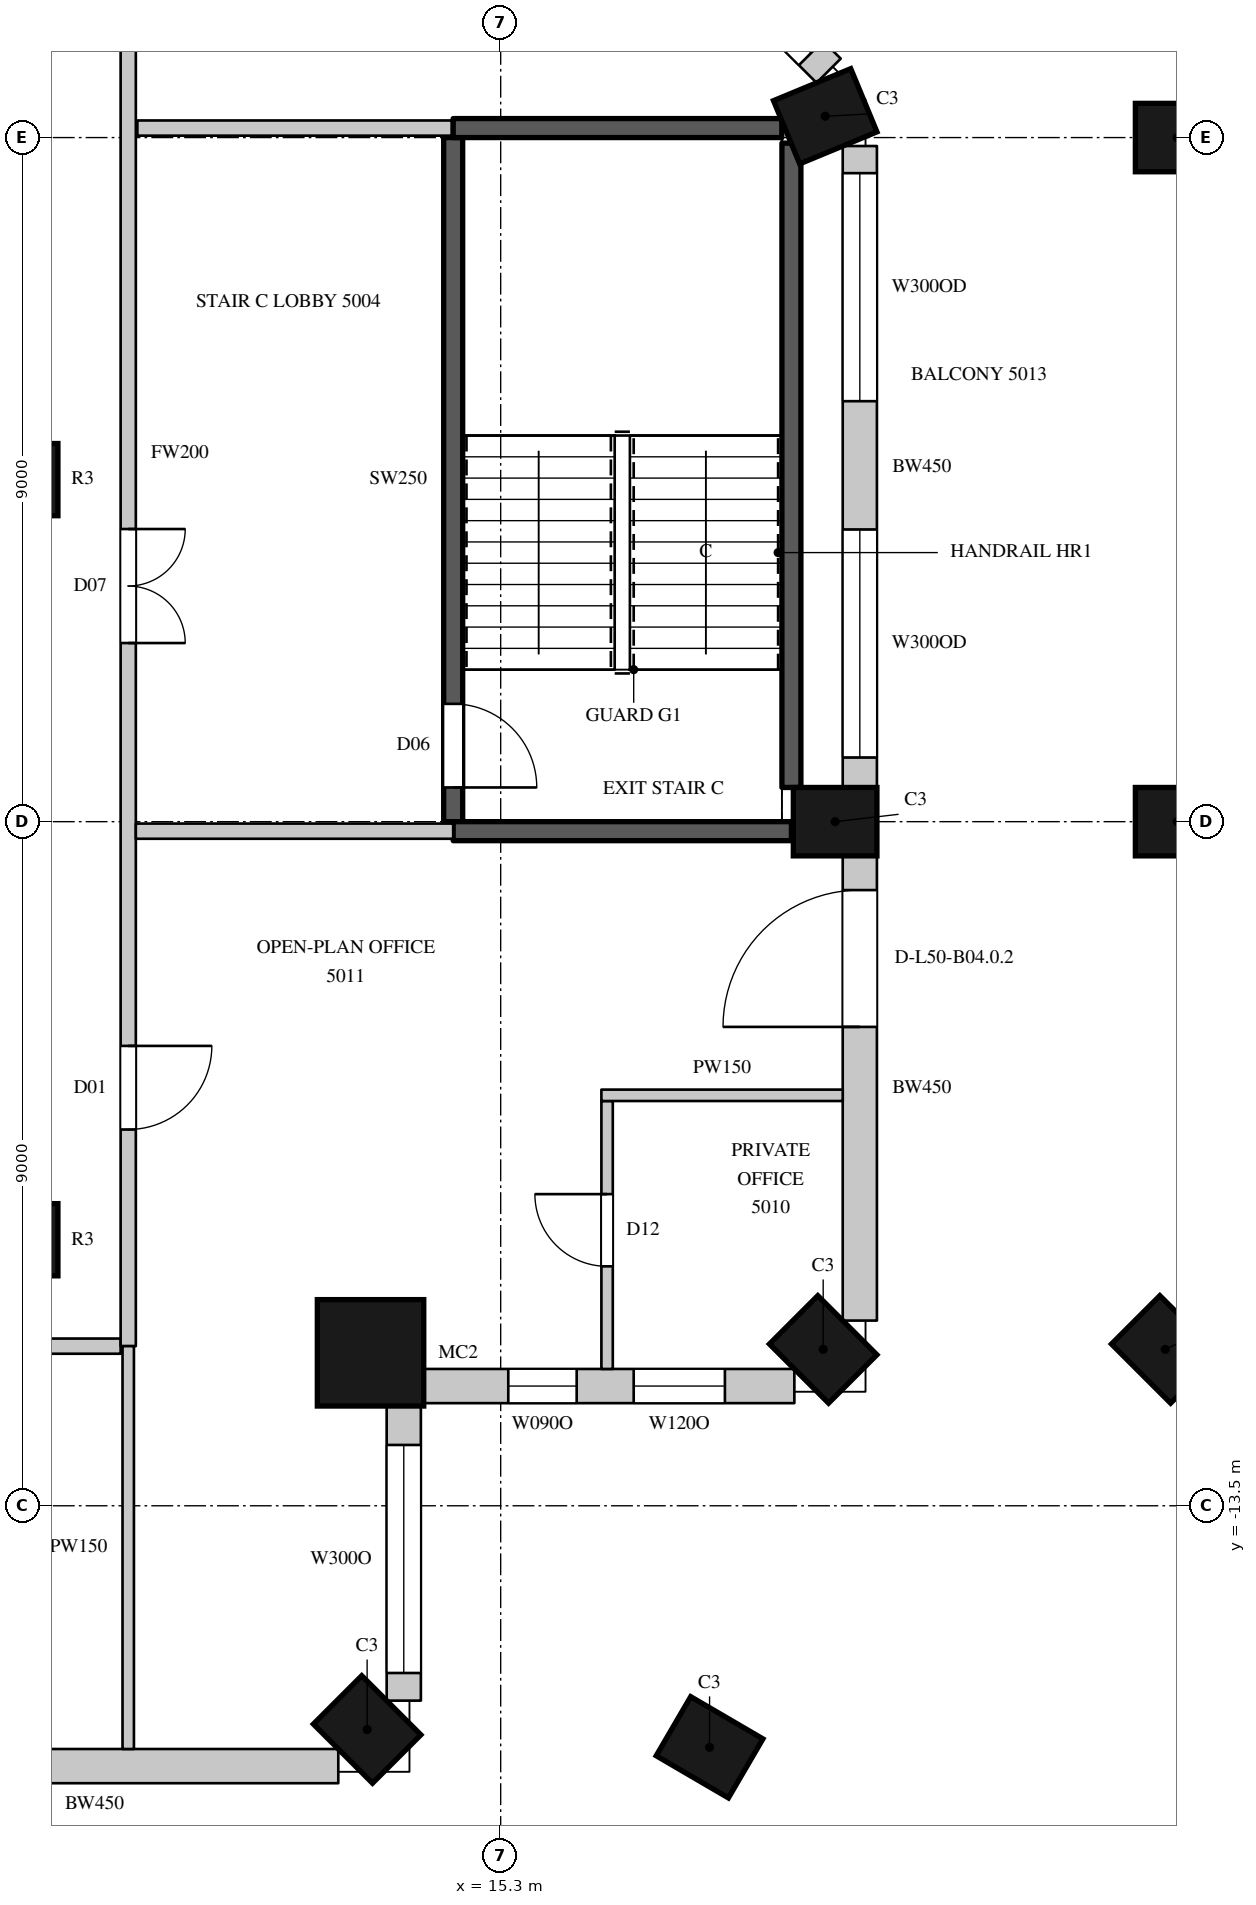
"""IFC4 building model, lengths in metres.
Left out: names, types, materials, properties, quantities, classifications, styles, units other than length and angle.
Written with IfcOpenShell. Run it as: python <this file> out.ifc"""

import sys

from ifc_helpers import new_model, si_unit, direction, frame, frame_2d, origin, origin_2d, place, context, subcontext, project, spatial, rectangle, circle, extrude, element, fill, save


model = new_model("IFC4")
c1 = context("Model", 3, precision=1e-05, world=origin(), true_north=direction((0.0, 1.0)))
c2 = subcontext(c1, "Body", "Model", "MODEL_VIEW")
j1 = project(units=[si_unit("LENGTHUNIT", "METRE"), si_unit("PLANEANGLEUNIT", "RADIAN")], contexts=[c1])
p1 = place(None, origin())
s1 = spatial("IfcSite", under=j1, at=p1, CompositionType="ELEMENT")
p2 = place(p1, origin())
s2 = spatial("IfcBuilding", under=s1, at=p2, CompositionType="ELEMENT")
p3 = place(p2, frame((0.0, 0.0, 226.1)))
s3 = spatial("IfcBuildingStorey", under=s2, at=p3, CompositionType="ELEMENT", Elevation=226.1)
p4 = place(p3, frame((13.543, -16.443, 0.0), z_axis=(0.0, 0.0, 1.0), x_axis=(0.707106781187, 0.707106781187, 0.0)))
e1 = element("IfcColumn", 1, at=p4, inside=s3, PredefinedType="COLUMN", context=c2, shape_type="SweptSolid", body=[
    extrude(rectangle(XDim=0.9, YDim=1.1, at=origin_2d()), origin(), (0.0, 0.0, 1.0), 4.1),
])
p5 = place(p3, frame((13.588, -11.488, 0.0), z_axis=(0.0, 0.0, 1.0), x_axis=(1.0, 0.0, 0.0)))
e2 = element("IfcColumn", 2, at=p5, inside=s3, PredefinedType="COLUMN", context=c2, shape_type="SweptSolid", body=[
    extrude(circle(Radius=0.7, at=origin_2d()), origin(), (0.0, 0.0, 1.0), 4.1),
])
for number, where, z_axis, x_axis in (
    (3, (19.543, -11.443, 0.0), (0.0, 0.0, 1.0), (0.707, 0.707, 0.0)),
    (4, (19.7, -4.5, 0.0), (0.0, 0.0, 1.0), (0.0, 1.0, 0.0)),
    (5, (19.57, 4.78, 0.0), (0.0, 0.0, 1.0), (-0.383, 0.924, 0.0)),
    (6, (18.048, -16.677, 0.0), (0.0, 0.0, 1.0), (0.504, 0.863, 0.0)),
    (7, (24.043, -11.443, 0.0), (0.0, 0.0, 1.0), (0.707, 0.707, 0.0)),
    (8, (24.2, -4.5, 0.0), (0.0, 0.0, 1.0), (0.0, 1.0, 0.0)),
    (9, (24.2, 4.5, 0.0), (0.0, 0.0, 1.0), (0.0, 1.0, 0.0)),
):
    element("IfcColumn", number, at=place(p3, frame(where, z_axis=z_axis, x_axis=x_axis)), inside=s3, PredefinedType="COLUMN", context=c2, shape_type="SweptSolid", body=[
        extrude(rectangle(XDim=0.9, YDim=1.1, at=origin_2d()), origin(), (0.0, 0.0, 1.0), 4.1),
    ])
for number, where, z_axis, x_axis in (
    (10, (9.0, -10.0, 0.0), (0.0, 0.0, 1.0), (1.0, 0.0, 0.0)),
    (11, (9.0, 0.0, 0.0), (0.0, 0.0, 1.0), (1.0, 0.0, 0.0)),
):
    element("IfcColumn", number, at=place(p3, frame(where, z_axis=z_axis, x_axis=x_axis)), inside=s3, PredefinedType="COLUMN", context=c2, shape_type="SweptSolid", body=[
        extrude(circle(Radius=0.475, at=origin_2d()), origin(), (0.0, 0.0, 1.0), 4.1),
    ])
p6 = place(p3, frame((6.75, -16.925, 0.0), z_axis=(0.0, 0.0, 1.0), x_axis=(1.0, 0.0, 0.0)))
e12 = element("IfcWall", 12, at=p6, inside=s3, PredefinedType="SOLIDWALL", context=c2, shape_type="SweptSolid", body=[
    extrude(rectangle(XDim=6.414, YDim=0.45, at=frame_2d((3.207, 0.0))), origin(), (0.0, 0.0, 1.0), 3.8),
])
p7 = place(p6, frame((0.525, 0.0, 0.0)))
e13 = element("IfcOpeningElement", 13, at=p7, cuts=e12, PredefinedType="OPENING", context=c2, shape_type="SweptSolid", body=[
    extrude(rectangle(XDim=1.8, YDim=2.4, at=frame_2d((0.9, 1.2))), frame((0.0, 0.235, 0.0), z_axis=(0.0, -1.0, 0.0), x_axis=(1.0, 0.0, 0.0)), (0.0, 0.0, 1.0), 0.47),
])
p8 = place(p3, frame((14.025, -16.064, 0.0), z_axis=(0.0, 0.0, 1.0), x_axis=(0.0, 1.0, 0.0)))
e14 = element("IfcWall", 14, at=p8, inside=s3, PredefinedType="SOLIDWALL", context=c2, shape_type="SweptSolid", body=[
    extrude(rectangle(XDim=3.909, YDim=0.45, at=frame_2d((1.955, 0.0))), origin(), (0.0, 0.0, 1.0), 3.8),
])
p9 = place(p8, frame((0.364, 0.0, 1.05)))
e15 = element("IfcOpeningElement", 15, at=p9, cuts=e14, PredefinedType="OPENING", context=c2, shape_type="SweptSolid", body=[
    extrude(rectangle(XDim=3.0, YDim=2.4, at=frame_2d((1.5, 1.2))), frame((0.0, 0.235, 0.0), z_axis=(0.0, -1.0, 0.0), x_axis=(1.0, 0.0, 0.0)), (0.0, 0.0, 1.0), 0.47),
])
p10 = place(p3, frame((14.255, -11.925, 0.0), z_axis=(0.0, 0.0, 1.0), x_axis=(1.0, 0.0, 0.0)))
e16 = element("IfcWall", 16, at=p10, inside=s3, PredefinedType="SOLIDWALL", context=c2, shape_type="SweptSolid", body=[
    extrude(rectangle(XDim=4.909, YDim=0.45, at=frame_2d((2.455, 0.0))), origin(), (0.0, 0.0, 1.0), 3.8),
])
p11 = place(p10, frame((1.146, 0.0, 1.05)))
e17 = element("IfcOpeningElement", 17, at=p11, cuts=e16, PredefinedType="OPENING", context=c2, shape_type="SweptSolid", body=[
    extrude(rectangle(XDim=0.9, YDim=2.4, at=frame_2d((0.45, 1.2))), frame((0.0, 0.235, 0.0), z_axis=(0.0, -1.0, 0.0), x_axis=(1.0, 0.0, 0.0)), (0.0, 0.0, 1.0), 0.47),
])
p12 = place(p10, frame((2.795, 0.0, 1.05)))
e18 = element("IfcOpeningElement", 18, at=p12, cuts=e16, PredefinedType="OPENING", context=c2, shape_type="SweptSolid", body=[
    extrude(rectangle(XDim=1.2, YDim=2.4, at=frame_2d((0.6, 1.2))), frame((0.0, 0.235, 0.0), z_axis=(0.0, -1.0, 0.0), x_axis=(1.0, 0.0, 0.0)), (0.0, 0.0, 1.0), 0.47),
])
p13 = place(p3, frame((20.025, -11.064, 0.0), z_axis=(0.0, 0.0, 1.0), x_axis=(0.0, 1.0, 0.0)))
e19 = element("IfcWall", 19, at=p13, inside=s3, PredefinedType="SOLIDWALL", context=c2, shape_type="SweptSolid", body=[
    extrude(rectangle(XDim=6.114, YDim=0.45, at=frame_2d((3.057, 0.0))), origin(), (0.0, 0.0, 1.0), 3.8),
])
p14 = place(p13, frame((3.864, 0.0, 0.0)))
e20 = element("IfcOpeningElement", 20, at=p14, cuts=e19, PredefinedType="OPENING", context=c2, shape_type="SweptSolid", body=[
    extrude(rectangle(XDim=1.8, YDim=2.4, at=frame_2d((0.9, 1.2))), frame((0.0, 0.235, 0.0), z_axis=(0.0, -1.0, 0.0), x_axis=(1.0, 0.0, 0.0)), (0.0, 0.0, 1.0), 0.47),
])
p15 = place(p3, frame((20.025, -4.05, 0.0), z_axis=(0.0, 0.0, 1.0), x_axis=(0.0, 1.0, 0.0)))
e21 = element("IfcWall", 21, at=p15, inside=s3, PredefinedType="SOLIDWALL", context=c2, shape_type="SweptSolid", body=[
    extrude(rectangle(XDim=8.439, YDim=0.45, at=frame_2d((4.219, 0.0))), origin(), (0.0, 0.0, 1.0), 3.8),
])
p16 = place(p15, frame((0.394, 0.0, 1.05)))
e22 = element("IfcOpeningElement", 22, at=p16, cuts=e21, PredefinedType="OPENING", context=c2, shape_type="SweptSolid", body=[
    extrude(rectangle(XDim=3.0, YDim=2.4, at=frame_2d((1.5, 1.2))), frame((0.0, 0.235, 0.0), z_axis=(0.0, -1.0, 0.0), x_axis=(1.0, 0.0, 0.0)), (0.0, 0.0, 1.0), 0.47),
])
p17 = place(p15, frame((5.082, 0.0, 1.05)))
e23 = element("IfcOpeningElement", 23, at=p17, cuts=e21, PredefinedType="OPENING", context=c2, shape_type="SweptSolid", body=[
    extrude(rectangle(XDim=3.0, YDim=2.4, at=frame_2d((1.5, 1.2))), frame((0.0, 0.235, 0.0), z_axis=(0.0, -1.0, 0.0), x_axis=(1.0, 0.0, 0.0)), (0.0, 0.0, 1.0), 0.47),
])
p18 = place(p3, frame((19.615, 5.379, 0.0), z_axis=(0.0, 0.0, 1.0), x_axis=(-0.707089646058, 0.7071239159, 0.0)))
e24 = element("IfcWall", 24, at=p18, inside=s3, PredefinedType="SOLIDWALL", context=c2, shape_type="SweptSolid", body=[
    extrude(rectangle(XDim=7.124, YDim=0.45, at=frame_2d((3.562, 0.0))), origin(), (0.0, 0.0, 1.0), 3.8),
])
p19 = place(p18, frame((0.328, 0.0, 1.05)))
e25 = element("IfcOpeningElement", 25, at=p19, cuts=e24, PredefinedType="OPENING", context=c2, shape_type="SweptSolid", body=[
    extrude(rectangle(XDim=2.4, YDim=2.4, at=frame_2d((1.2, 1.2))), frame((0.0, 0.235, 0.0), z_axis=(0.0, -1.0, 0.0), x_axis=(1.0, 0.0, 0.0)), (0.0, 0.0, 1.0), 0.47),
])
p20 = place(p18, frame((4.359, 0.0, 1.05)))
e26 = element("IfcOpeningElement", 26, at=p20, cuts=e24, PredefinedType="OPENING", context=c2, shape_type="SweptSolid", body=[
    extrude(rectangle(XDim=2.4, YDim=2.4, at=frame_2d((1.2, 1.2))), frame((0.0, 0.235, 0.0), z_axis=(0.0, -1.0, 0.0), x_axis=(1.0, 0.0, 0.0)), (0.0, 0.0, 1.0), 0.47),
])
p21 = place(p3, frame((21.1, -0.617, 0.0), z_axis=(0.0, 0.0, 1.0), x_axis=(0.0, 1.0, 0.0)))
e27 = element("IfcWall", 27, at=p21, inside=s3, PredefinedType="SOLIDWALL", context=c2, shape_type="SweptSolid", body=[
    extrude(rectangle(XDim=2.567, YDim=0.45, at=frame_2d((1.283, 0.0))), origin(), (0.0, 0.0, 1.0), 0.6),
])
p22 = place(p3, frame((-10.9, -11.4, 0.0), z_axis=(0.0, 0.0, 1.0), x_axis=(1.0, 0.0, 0.0)))
e28 = element("IfcWall", 28, at=p22, inside=s3, PredefinedType="PARTITIONING", context=c2, shape_type="SweptSolid", body=[
    extrude(rectangle(XDim=21.2, YDim=0.2, at=frame_2d((10.6, 0.0))), origin(), (0.0, 0.0, 1.0), 3.8),
])
p23 = place(p22, frame((0.95, 0.0, 0.0)))
e29 = element("IfcOpeningElement", 29, at=p23, cuts=e28, PredefinedType="OPENING", context=c2, shape_type="SweptSolid", body=[
    extrude(rectangle(XDim=0.95, YDim=2.2, at=frame_2d((0.475, 1.1))), frame((0.0, 0.11, 0.0), z_axis=(0.0, -1.0, 0.0), x_axis=(1.0, 0.0, 0.0)), (0.0, 0.0, 1.0), 0.22),
])
p24 = place(p22, frame((4.2, 0.0, 0.0)))
e30 = element("IfcOpeningElement", 30, at=p24, cuts=e28, PredefinedType="OPENING", context=c2, shape_type="SweptSolid", body=[
    extrude(rectangle(XDim=0.9, YDim=2.2, at=frame_2d((0.45, 1.1))), frame((0.0, 0.11, 0.0), z_axis=(0.0, -1.0, 0.0), x_axis=(1.0, 0.0, 0.0)), (0.0, 0.0, 1.0), 0.22),
])
p25 = place(p22, frame((8.35, 0.0, 0.0)))
e31 = element("IfcOpeningElement", 31, at=p25, cuts=e28, PredefinedType="OPENING", context=c2, shape_type="SweptSolid", body=[
    extrude(rectangle(XDim=1.1, YDim=2.4, at=frame_2d((0.55, 1.2))), frame((0.0, 0.11, 0.0), z_axis=(0.0, -1.0, 0.0), x_axis=(1.0, 0.0, 0.0)), (0.0, 0.0, 1.0), 0.22),
])
p26 = place(p22, frame((18.0, 0.0, 0.0)))
e32 = element("IfcOpeningElement", 32, at=p26, cuts=e28, PredefinedType="OPENING", context=c2, shape_type="SweptSolid", body=[
    extrude(rectangle(XDim=1.1, YDim=2.4, at=frame_2d((0.55, 1.2))), frame((0.0, 0.11, 0.0), z_axis=(0.0, -1.0, 0.0), x_axis=(1.0, 0.0, 0.0)), (0.0, 0.0, 1.0), 0.22),
])
p27 = place(p3, frame((10.4, -11.4, 0.0), z_axis=(0.0, 0.0, 1.0), x_axis=(0.0, 1.0, 0.0)))
e33 = element("IfcWall", 33, at=p27, inside=s3, PredefinedType="PARTITIONING", context=c2, shape_type="SweptSolid", body=[
    extrude(rectangle(XDim=23.5, YDim=0.2, at=frame_2d((11.75, 0.0))), origin(), (0.0, 0.0, 1.0), 3.8),
])
p28 = place(p27, frame((9.25, 0.0, 0.0)))
e34 = element("IfcOpeningElement", 34, at=p28, cuts=e33, PredefinedType="OPENING", context=c2, shape_type="SweptSolid", body=[
    extrude(rectangle(XDim=1.5, YDim=2.4, at=frame_2d((0.75, 1.2))), frame((0.0, 0.11, 0.0), z_axis=(0.0, -1.0, 0.0), x_axis=(1.0, 0.0, 0.0)), (0.0, 0.0, 1.0), 0.22),
])
p29 = place(p27, frame((2.85, 0.0, 0.0)))
e35 = element("IfcOpeningElement", 35, at=p29, cuts=e33, PredefinedType="OPENING", context=c2, shape_type="SweptSolid", body=[
    extrude(rectangle(XDim=1.1, YDim=2.4, at=frame_2d((0.55, 1.2))), frame((0.0, 0.11, 0.0), z_axis=(0.0, -1.0, 0.0), x_axis=(1.0, 0.0, 0.0)), (0.0, 0.0, 1.0), 0.22),
])
p30 = place(p3, frame((10.5, -4.625, 0.0), z_axis=(0.0, 0.0, 1.0), x_axis=(1.0, 0.0, 0.0)))
e36 = element("IfcWall", 36, at=p30, inside=s3, PredefinedType="PARTITIONING", context=c2, shape_type="SweptSolid", body=[
    extrude(rectangle(XDim=4.175, YDim=0.2, at=frame_2d((2.087, 0.0))), origin(), (0.0, 0.0, 1.0), 3.8),
])
p31 = place(p3, frame((10.52, 4.625, 0.0), z_axis=(0.0, 0.0, 1.0), x_axis=(1.0, 0.0, 0.0)))
e37 = element("IfcWall", 37, at=p31, inside=s3, PredefinedType="PARTITIONING", context=c2, shape_type="SweptSolid", body=[
    extrude(rectangle(XDim=4.135, YDim=0.2, at=frame_2d((2.067, 0.0))), origin(), (0.0, 0.0, 1.0), 3.8),
])
p32 = place(p3, frame((10.4, -16.7, 0.0), z_axis=(0.0, 0.0, 1.0), x_axis=(0.0, 1.0, 0.0)))
e38 = element("IfcWall", 38, at=p32, inside=s3, PredefinedType="PARTITIONING", context=c2, shape_type="SweptSolid", body=[
    extrude(rectangle(XDim=5.3, YDim=0.15, at=frame_2d((2.65, 0.0))), origin(), (0.0, 0.0, 1.0), 3.8),
])
p33 = place(p3, frame((16.7, -11.7, 0.0), z_axis=(0.0, 0.0, 1.0), x_axis=(0.0, 1.0, 0.0)))
e39 = element("IfcWall", 39, at=p33, inside=s3, PredefinedType="PARTITIONING", context=c2, shape_type="SweptSolid", body=[
    extrude(rectangle(XDim=3.525, YDim=0.15, at=frame_2d((1.762, 0.0))), origin(), (0.0, 0.0, 1.0), 3.8),
])
p34 = place(p33, frame((1.35, 0.0, 0.0)))
e40 = element("IfcOpeningElement", 40, at=p34, cuts=e39, PredefinedType="OPENING", context=c2, shape_type="SweptSolid", body=[
    extrude(rectangle(XDim=0.95, YDim=2.2, at=frame_2d((0.475, 1.1))), frame((0.0, 0.085, 0.0), z_axis=(0.0, -1.0, 0.0), x_axis=(1.0, 0.0, 0.0)), (0.0, 0.0, 1.0), 0.17),
])
p35 = place(p3, frame((16.625, -8.1, 0.0), z_axis=(0.0, 0.0, 1.0), x_axis=(1.0, 0.0, 0.0)))
e41 = element("IfcWall", 41, at=p35, inside=s3, PredefinedType="PARTITIONING", context=c2, shape_type="SweptSolid", body=[
    extrude(rectangle(XDim=3.175, YDim=0.15, at=frame_2d((1.587, 0.0))), origin(), (0.0, 0.0, 1.0), 3.15),
])
p36 = place(p3, frame((14.675, -4.5, 0.0), z_axis=(0.0, 0.0, 1.0), x_axis=(0.0, 1.0, 0.0)))
e42 = element("IfcWall", 42, at=p36, inside=s3, PredefinedType="SHEAR", context=c2, shape_type="SweptSolid", body=[
    extrude(rectangle(XDim=9.0, YDim=0.25, at=frame_2d((4.5, 0.0))), origin(), (0.0, 0.0, 1.0), 3.8),
])
p37 = place(p36, frame((0.45, 0.0, 0.0)))
e43 = element("IfcOpeningElement", 43, at=p37, cuts=e42, PredefinedType="OPENING", context=c2, shape_type="SweptSolid", body=[
    extrude(rectangle(XDim=1.1, YDim=2.2, at=frame_2d((0.55, 1.1))), frame((0.0, 0.135, 0.0), z_axis=(0.0, -1.0, 0.0), x_axis=(1.0, 0.0, 0.0)), (0.0, 0.0, 1.0), 0.27),
])
p38 = place(p3, frame((14.675, -4.625, 0.0), z_axis=(0.0, 0.0, 1.0), x_axis=(1.0, 0.0, 0.0)))
e44 = element("IfcWall", 44, at=p38, inside=s3, PredefinedType="SHEAR", context=c2, shape_type="SweptSolid", body=[
    extrude(rectangle(XDim=4.45, YDim=0.25, at=frame_2d((2.225, 0.0))), origin(), (0.0, 0.0, 1.0), 3.8),
])
p39 = place(p3, frame((14.675, 4.625, 0.0), z_axis=(0.0, 0.0, 1.0), x_axis=(1.0, 0.0, 0.0)))
e45 = element("IfcWall", 45, at=p39, inside=s3, PredefinedType="SHEAR", context=c2, shape_type="SweptSolid", body=[
    extrude(rectangle(XDim=4.324, YDim=0.25, at=frame_2d((2.162, 0.0))), origin(), (0.0, 0.0, 1.0), 3.8),
])
p40 = place(p3, frame((19.125, -4.05, 0.0), z_axis=(0.0, 0.0, 1.0), x_axis=(0.0, 1.0, 0.0)))
e46 = element("IfcWall", 46, at=p40, inside=s3, PredefinedType="SHEAR", context=c2, shape_type="SweptSolid", body=[
    extrude(rectangle(XDim=8.477, YDim=0.25, at=frame_2d((4.238, 0.0))), origin(), (0.0, 0.0, 1.0), 3.8),
])
p41 = place(p9, origin())
e47 = element("IfcWindow", 47, at=p41, inside=s3, PartitioningType="SINGLE_PANEL", PredefinedType="WINDOW", context=c2, shape_type="SweptSolid", body=[
    extrude(rectangle(XDim=3.0, YDim=2.4, at=frame_2d((1.5, 1.2))), frame((0.0, 0.135, 0.0), z_axis=(0.0, -1.0, 0.0), x_axis=(1.0, 0.0, 0.0)), (0.0, 0.0, 1.0), 0.06),
])
fill(e15, e47)
p42 = place(p14, origin())
e48 = element("IfcDoor", 48, at=p42, inside=s3, OperationType="SLIDING_TO_LEFT", PredefinedType="DOOR", context=c2, shape_type="SweptSolid", body=[
    extrude(rectangle(XDim=1.8, YDim=2.4, at=frame_2d((0.9, 1.2))), frame((0.0, 0.13, 0.0), z_axis=(0.0, -1.0, 0.0), x_axis=(1.0, 0.0, 0.0)), (0.0, 0.0, 1.0), 0.05),
])
fill(e20, e48)
p43 = place(p16, origin())
e49 = element("IfcWindow", 49, at=p43, inside=s3, PartitioningType="SINGLE_PANEL", PredefinedType="WINDOW", context=c2, shape_type="SweptSolid", body=[
    extrude(rectangle(XDim=3.0, YDim=2.4, at=frame_2d((1.5, 1.2))), frame((0.0, 0.135, 0.0), z_axis=(0.0, -1.0, 0.0), x_axis=(1.0, 0.0, 0.0)), (0.0, 0.0, 1.0), 0.06),
])
fill(e22, e49)
p44 = place(p17, origin())
e50 = element("IfcWindow", 50, at=p44, inside=s3, PartitioningType="SINGLE_PANEL", PredefinedType="WINDOW", context=c2, shape_type="SweptSolid", body=[
    extrude(rectangle(XDim=3.0, YDim=2.4, at=frame_2d((1.5, 1.2))), frame((0.0, 0.135, 0.0), z_axis=(0.0, -1.0, 0.0), x_axis=(1.0, 0.0, 0.0)), (0.0, 0.0, 1.0), 0.06),
])
fill(e23, e50)
p45 = place(p19, origin())
e51 = element("IfcWindow", 51, at=p45, inside=s3, PartitioningType="SINGLE_PANEL", PredefinedType="WINDOW", context=c2, shape_type="SweptSolid", body=[
    extrude(rectangle(XDim=2.4, YDim=2.4, at=frame_2d((1.2, 1.2))), frame((0.0, 0.135, 0.0), z_axis=(0.0, -1.0, 0.0), x_axis=(1.0, 0.0, 0.0)), (0.0, 0.0, 1.0), 0.06),
])
fill(e25, e51)
p46 = place(p28, origin())
e52 = element("IfcDoor", 52, at=p46, inside=s3, OperationType="DOUBLE_DOOR_SINGLE_SWING", PredefinedType="DOOR", context=c2, shape_type="SweptSolid", body=[
    extrude(rectangle(XDim=1.5, YDim=2.4, at=frame_2d((0.75, 1.2))), frame((0.0, 0.025, 0.0), z_axis=(0.0, -1.0, 0.0), x_axis=(1.0, 0.0, 0.0)), (0.0, 0.0, 1.0), 0.05),
])
fill(e34, e52)
p47 = place(p29, origin())
e53 = element("IfcDoor", 53, at=p47, inside=s3, OperationType="SINGLE_SWING_LEFT", PredefinedType="DOOR", context=c2, shape_type="SweptSolid", body=[
    extrude(rectangle(XDim=1.1, YDim=2.4, at=frame_2d((0.55, 1.2))), frame((0.0, 0.025, 0.0), z_axis=(0.0, -1.0, 0.0), x_axis=(1.0, 0.0, 0.0)), (0.0, 0.0, 1.0), 0.05),
])
fill(e35, e53)
p48 = place(p34, origin())
e54 = element("IfcDoor", 54, at=p48, inside=s3, OperationType="SINGLE_SWING_RIGHT", PredefinedType="DOOR", context=c2, shape_type="SweptSolid", body=[
    extrude(rectangle(XDim=0.95, YDim=2.2, at=frame_2d((0.475, 1.1))), frame((0.0, 0.025, 0.0), z_axis=(0.0, -1.0, 0.0), x_axis=(1.0, 0.0, 0.0)), (0.0, 0.0, 1.0), 0.05),
])
fill(e40, e54)
p49 = place(p37, origin())
e55 = element("IfcDoor", 55, at=p49, inside=s3, OperationType="SINGLE_SWING_RIGHT", PredefinedType="DOOR", context=c2, shape_type="SweptSolid", body=[
    extrude(rectangle(XDim=1.1, YDim=2.2, at=frame_2d((0.55, 1.1))), frame((0.0, 0.025, 0.0), z_axis=(0.0, -1.0, 0.0), x_axis=(1.0, 0.0, 0.0)), (0.0, 0.0, 1.0), 0.05),
])
fill(e43, e55)
p50 = place(p11, origin())
e56 = element("IfcWindow", 56, at=p50, inside=s3, PartitioningType="SINGLE_PANEL", PredefinedType="WINDOW", context=c2, shape_type="SweptSolid", body=[
    extrude(rectangle(XDim=0.9, YDim=2.4, at=frame_2d((0.45, 1.2))), frame((0.0, 0.135, 0.0), z_axis=(0.0, -1.0, 0.0), x_axis=(1.0, 0.0, 0.0)), (0.0, 0.0, 1.0), 0.06),
])
fill(e17, e56)
p51 = place(p12, origin())
e57 = element("IfcWindow", 57, at=p51, inside=s3, PartitioningType="SINGLE_PANEL", PredefinedType="WINDOW", context=c2, shape_type="SweptSolid", body=[
    extrude(rectangle(XDim=1.2, YDim=2.4, at=frame_2d((0.6, 1.2))), frame((0.0, 0.135, 0.0), z_axis=(0.0, -1.0, 0.0), x_axis=(1.0, 0.0, 0.0)), (0.0, 0.0, 1.0), 0.06),
])
fill(e18, e57)
save(model, sys.argv[1])
